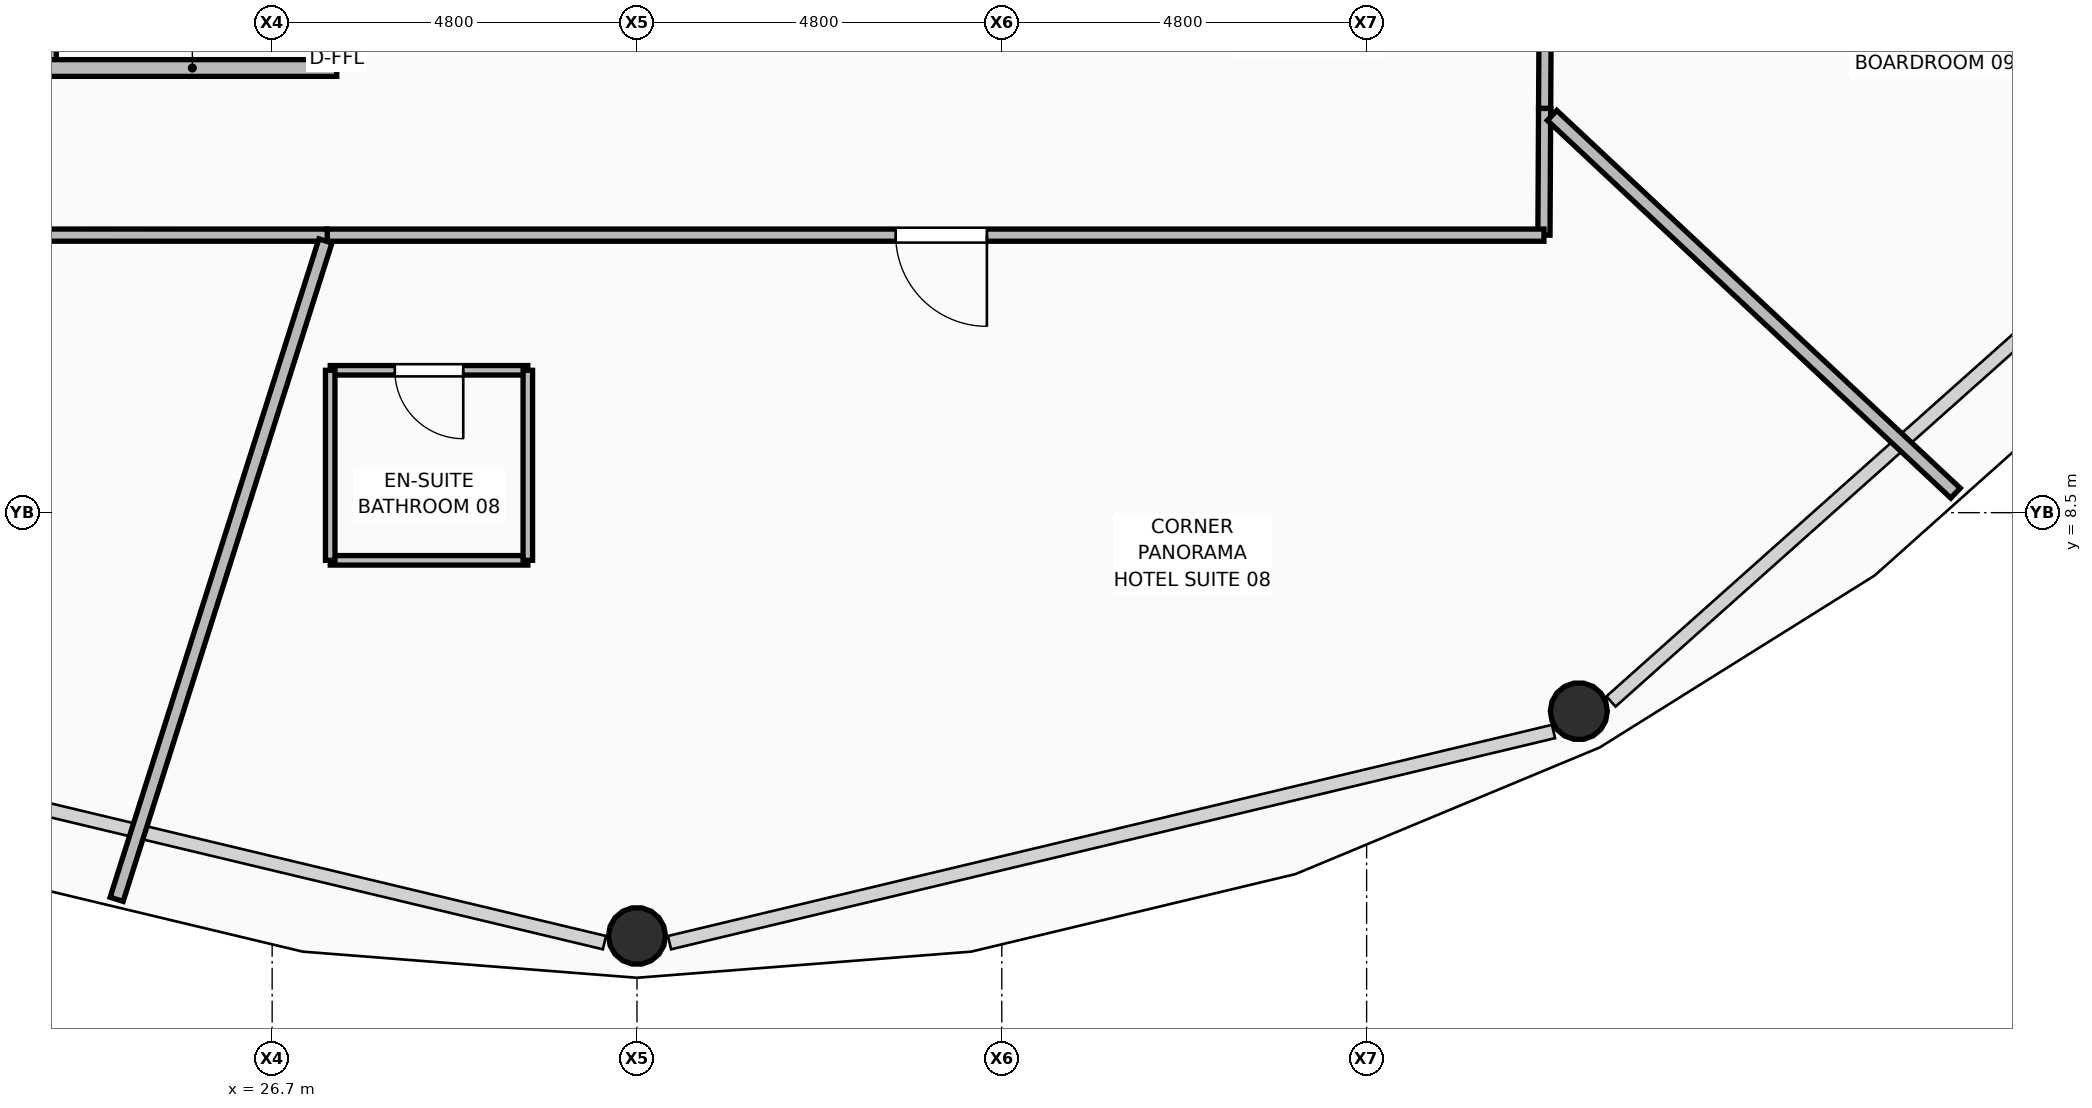
"""IFC4 building model, lengths in metres.
Left out: names, types, materials, properties, quantities, classifications, styles, units other than length and angle.
Written with IfcOpenShell. Run it as: python <this file> out.ifc"""

import sys

from ifc_helpers import new_model, si_unit, direction, frame, frame_2d, origin, origin_2d, place, context, subcontext, project, spatial, rectangle, hollow_circle, extrude, element, fill, save


model = new_model("IFC4")
c1 = context("Model", 3, precision=1e-05, world=origin(), true_north=direction((0.0, 1.0)))
c2 = subcontext(c1, "Body", "Model", "MODEL_VIEW")
j1 = project(units=[si_unit("LENGTHUNIT", "METRE"), si_unit("PLANEANGLEUNIT", "RADIAN")], contexts=[c1])
p1 = place(None, origin())
s1 = spatial("IfcSite", under=j1, at=p1, CompositionType="ELEMENT")
p2 = place(p1, origin())
s2 = spatial("IfcBuilding", under=s1, at=p2, CompositionType="ELEMENT")
p3 = place(p2, frame((0.0, 0.0, 160.95)))
s3 = spatial("IfcBuildingStorey", under=s2, at=p3, CompositionType="ELEMENT", Elevation=160.95)
p4 = place(p3, frame((31.5, 2.931, 0.0), z_axis=(0.0, 0.061838614669, 0.998086161479), x_axis=(-1.0, 0.0, 0.0)))
e1 = element("IfcColumn", 1, at=p4, inside=s3, PredefinedType="COLUMN", context=c2, shape_type="SweptSolid", body=[
    extrude(hollow_circle(Radius=0.375, WallThickness=0.035, at=origin_2d()), origin(), (0.0, 0.0, 1.0), 3.577),
])
p5 = place(p3, frame((43.892, 5.888, 0.0), z_axis=(-0.034669243934, 0.053437043308, 0.997969200891), x_axis=(-0.838908401488, -0.544272628296, 0.0)))
e2 = element("IfcColumn", 2, at=p5, inside=s3, PredefinedType="COLUMN", context=c2, shape_type="SweptSolid", body=[
    extrude(hollow_circle(Radius=0.375, WallThickness=0.035, at=origin_2d()), origin(), (0.0, 0.0, 1.0), 3.577),
])
p6 = place(p3, frame((23.75, 14.35, 0.0), z_axis=(0.0, 0.0, 1.0), x_axis=(0.0, 1.0, 0.0)))
e3 = element("IfcWall", 3, at=p6, inside=s3, PredefinedType="PARTITIONING", context=c2, shape_type="SweptSolid", body=[
    extrude(rectangle(XDim=3.45, YDim=0.22, at=frame_2d((1.725, 0.0))), origin(), (0.0, 0.0, 1.0), 3.006),
])
p7 = place(p3, frame((23.75, 14.35, 0.0), z_axis=(0.0, 0.0, 1.0), x_axis=(1.0, 0.0, 0.0)))
e4 = element("IfcWall", 4, at=p7, inside=s3, PredefinedType="PARTITIONING", context=c2, shape_type="SweptSolid", body=[
    extrude(rectangle(XDim=3.8, YDim=0.22, at=frame_2d((1.9, 0.0))), origin(), (0.0, 0.0, 1.0), 3.55),
])
p8 = place(p3, frame((27.55, 14.35, 0.0), z_axis=(0.0, 0.0, 1.0), x_axis=(0.0, 1.0, 0.0)))
e5 = element("IfcWall", 5, at=p8, inside=s3, PredefinedType="PARTITIONING", context=c2, shape_type="SweptSolid", body=[
    extrude(rectangle(XDim=3.45, YDim=0.22, at=frame_2d((1.725, 0.0))), origin(), (0.0, 0.0, 1.0), 3.006),
])
p9 = place(p8, frame((1.175, 0.0, 0.0)))
e6 = element("IfcOpeningElement", 6, at=p9, cuts=e5, PredefinedType="OPENING", context=c2, shape_type="SweptSolid", body=[
    extrude(rectangle(XDim=1.1, YDim=2.1, at=frame_2d((0.55, 1.05))), frame((0.0, 0.12, 0.0), z_axis=(0.0, -1.0, 0.0), x_axis=(1.0, 0.0, 0.0)), (0.0, 0.0, 1.0), 0.24),
])
p10 = place(p3, frame((43.465, 17.96, 0.0), z_axis=(0.0, 0.0, 1.0), x_axis=(-0.005599676426, -0.999984321689, 0.0)))
e7 = element("IfcWall", 7, at=p10, inside=s3, PredefinedType="PARTITIONING", context=c2, shape_type="SweptSolid", body=[
    extrude(rectangle(XDim=4.142, YDim=0.16, at=frame_2d((2.071, 0.0))), origin(), (0.0, 0.0, 1.0), 3.006),
])
p11 = place(p10, frame((0.16, 0.0, 0.0)))
e8 = element("IfcOpeningElement", 8, at=p11, cuts=e7, PredefinedType="OPENING", context=c2, shape_type="SweptSolid", body=[
    extrude(rectangle(XDim=1.2, YDim=2.1, at=frame_2d((0.6, 1.05))), frame((0.0, 0.09, 0.0), z_axis=(0.0, -1.0, 0.0), x_axis=(1.0, 0.0, 0.0)), (0.0, 0.0, 1.0), 0.18),
])
p12 = place(p3, frame((43.442, 13.818, 0.0), z_axis=(0.0, 0.0, 1.0), x_axis=(-0.005271562423, -0.999986105218, 0.0)))
e9 = element("IfcWall", 9, at=p12, inside=s3, PredefinedType="PARTITIONING", context=c2, shape_type="SweptSolid", body=[
    extrude(rectangle(XDim=1.667, YDim=0.16, at=frame_2d((0.833, 0.0))), origin(), (0.0, 0.0, 1.0), 3.55),
])
p13 = place(p3, frame((43.433, 12.151, 0.0), z_axis=(0.0, 0.0, 1.0), x_axis=(-1.0, 0.0, 0.0)))
e10 = element("IfcWall", 10, at=p13, inside=s3, PredefinedType="PARTITIONING", context=c2, shape_type="SweptSolid", body=[
    extrude(rectangle(XDim=16.008, YDim=0.16, at=frame_2d((8.004, 0.0))), origin(), (0.0, 0.0, 1.0), 3.006),
])
p14 = place(p13, frame((7.329, 0.0, 0.0)))
e11 = element("IfcOpeningElement", 11, at=p14, cuts=e10, PredefinedType="OPENING", context=c2, shape_type="SweptSolid", body=[
    extrude(rectangle(XDim=1.2, YDim=2.1, at=frame_2d((0.6, 1.05))), frame((0.0, 0.09, 0.0), z_axis=(0.0, -1.0, 0.0), x_axis=(1.0, 0.0, 0.0)), (0.0, 0.0, 1.0), 0.18),
])
p15 = place(p3, frame((27.425, 12.151, 0.0), z_axis=(0.0, 0.0, 1.0), x_axis=(-0.999999987946, 0.000155265036, 0.0)))
e12 = element("IfcWall", 12, at=p15, inside=s3, PredefinedType="PARTITIONING", context=c2, shape_type="SweptSolid", body=[
    extrude(rectangle(XDim=7.862, YDim=0.16, at=frame_2d((3.931, 0.0))), origin(), (0.0, 0.0, 1.0), 3.006),
])
p16 = place(p3, frame((27.401, 12.075, 0.0), z_axis=(0.0, 0.0, 1.0), x_axis=(-0.302281968235, -0.953218553995, 0.0)))
e13 = element("IfcWall", 13, at=p16, inside=s3, PredefinedType="PARTITIONING", context=c2, shape_type="SweptSolid", body=[
    extrude(rectangle(XDim=9.087, YDim=0.18, at=frame_2d((4.543, 0.0))), origin(), (0.0, 0.0, 1.0), 2.852),
])
p17 = place(p3, frame((43.54, 13.726, 0.0), z_axis=(0.0, 0.0, 1.0), x_axis=(0.730026032341, -0.683419338404, 0.0)))
e14 = element("IfcWall", 14, at=p17, inside=s3, PredefinedType="PARTITIONING", context=c2, shape_type="SweptSolid", body=[
    extrude(rectangle(XDim=7.271, YDim=0.18, at=frame_2d((3.635, 0.0))), origin(), (0.0, 0.0, 1.0), 2.852),
])
p18 = place(p3, frame((27.464, 7.873, 0.0), z_axis=(0.0, 0.0, 1.0), x_axis=(1.0, 0.0, 0.0)))
e15 = element("IfcWall", 15, at=p18, inside=s3, PredefinedType="PARTITIONING", context=c2, shape_type="SweptSolid", body=[
    extrude(rectangle(XDim=2.6, YDim=0.125, at=frame_2d((1.3, 0.0))), origin(), (0.0, 0.0, 1.0), 3.55),
])
p19 = place(p3, frame((27.464, 10.373, 0.0), z_axis=(0.0, 0.0, 1.0), x_axis=(1.0, 0.0, 0.0)))
e16 = element("IfcWall", 16, at=p19, inside=s3, PredefinedType="PARTITIONING", context=c2, shape_type="SweptSolid", body=[
    extrude(rectangle(XDim=2.6, YDim=0.125, at=frame_2d((1.3, 0.0))), origin(), (0.0, 0.0, 1.0), 3.55),
])
p20 = place(p19, frame((0.85, 0.0, 0.0)))
e17 = element("IfcOpeningElement", 17, at=p20, cuts=e16, PredefinedType="OPENING", context=c2, shape_type="SweptSolid", body=[
    extrude(rectangle(XDim=0.9, YDim=2.1, at=frame_2d((0.45, 1.05))), frame((0.0, 0.073, 0.0), z_axis=(0.0, -1.0, 0.0), x_axis=(1.0, 0.0, 0.0)), (0.0, 0.0, 1.0), 0.145),
])
for number, where, z_axis, x_axis in (
    (18, (27.464, 7.873, 0.0), (0.0, 0.0, 1.0), (0.0, 1.0, 0.0)),
    (19, (30.064, 7.873, 0.0), (0.0, 0.0, 1.0), (0.0, 1.0, 0.0)),
):
    element("IfcWall", number, at=place(p3, frame(where, z_axis=z_axis, x_axis=x_axis)), inside=s3, PredefinedType="PARTITIONING", context=c2, shape_type="SweptSolid", body=[
        extrude(rectangle(XDim=2.5, YDim=0.125, at=frame_2d((1.25, 0.0))), origin(), (0.0, 0.0, 1.0), 3.55),
    ])
p21 = place(p20, frame((0.9, 0.0, 0.0), z_axis=(0.0, 0.0, 1.0), x_axis=(-1.0, 0.0, 0.0)))
e20 = element("IfcDoor", 20, at=p21, inside=s3, OperationType="SINGLE_SWING_LEFT", PredefinedType="DOOR", context=c2, shape_type="SweptSolid", body=[
    extrude(rectangle(XDim=0.9, YDim=2.1, at=frame_2d((0.45, 1.05))), frame((0.0, 0.025, 0.0), z_axis=(0.0, -1.0, 0.0), x_axis=(1.0, 0.0, 0.0)), (0.0, 0.0, 1.0), 0.05),
])
fill(e17, e20)
p22 = place(p14, origin())
e21 = element("IfcDoor", 21, at=p22, inside=s3, OperationType="SINGLE_SWING_LEFT", PredefinedType="DOOR", context=c2, shape_type="SweptSolid", body=[
    extrude(rectangle(XDim=1.2, YDim=2.1, at=frame_2d((0.6, 1.05))), frame((0.0, 0.025, 0.0), z_axis=(0.0, -1.0, 0.0), x_axis=(1.0, 0.0, 0.0)), (0.0, 0.0, 1.0), 0.05),
])
fill(e11, e21)
save(model, sys.argv[1])
